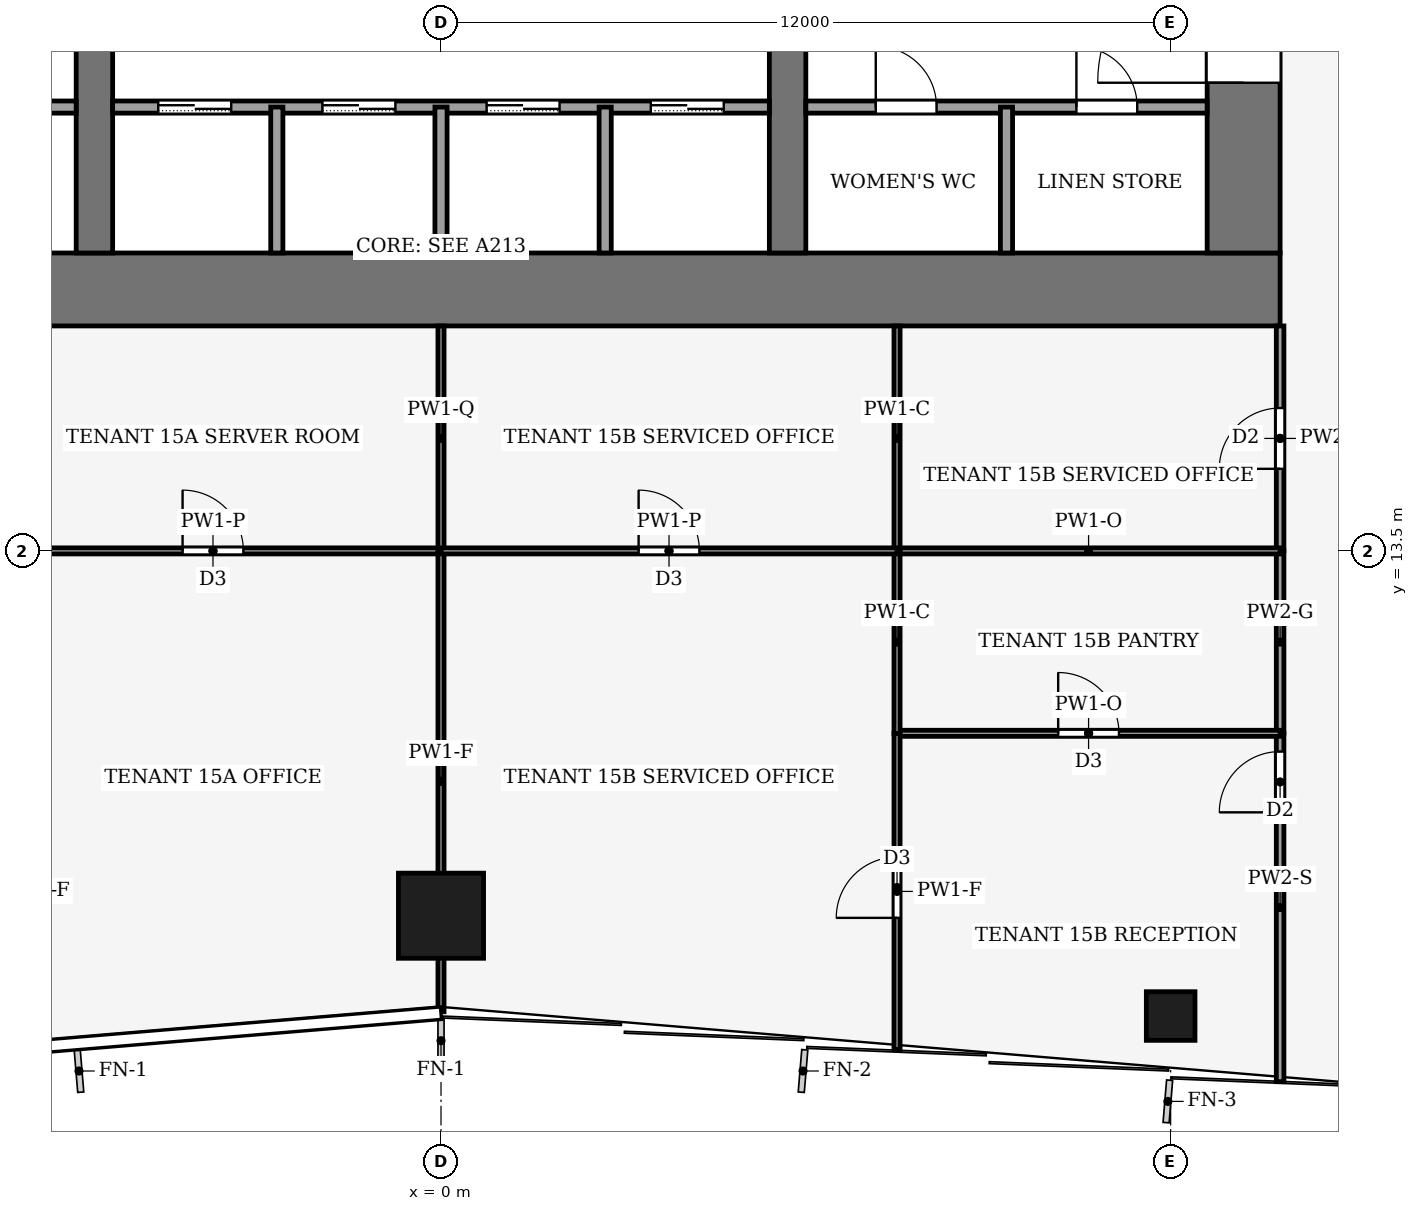
"""IFC4 building model, lengths in metres.
Left out: names, types, materials, properties, quantities, classifications, styles, units other than length and angle.
Written with IfcOpenShell. Run it as: python <this file> out.ifc"""

import sys

from ifc_helpers import new_model, si_unit, direction, frame, frame_2d, origin, origin_2d, place, context, subcontext, project, spatial, rectangle, hollow_rectangle, extrude, element, fill, save


model = new_model("IFC4")
c1 = context("Model", 3, precision=1e-05, world=origin(), true_north=direction((0.0, 1.0)))
c2 = subcontext(c1, "Body", "Model", "MODEL_VIEW")
j1 = project(units=[si_unit("LENGTHUNIT", "METRE"), si_unit("PLANEANGLEUNIT", "RADIAN")], contexts=[c1])
p1 = place(None, origin())
s1 = spatial("IfcSite", under=j1, at=p1, CompositionType="ELEMENT")
p2 = place(p1, origin())
s2 = spatial("IfcBuilding", under=s1, at=p2, CompositionType="ELEMENT")
p3 = place(p2, frame((0.0, 0.0, 70.0)))
s3 = spatial("IfcBuildingStorey", under=s2, at=p3, CompositionType="ELEMENT", Elevation=70.0)
p4 = place(p3, frame((-13.8, 17.8, -0.13), z_axis=(0.0, 0.0, 1.0), x_axis=(1.0, 0.0, 0.0)))
e1 = element("IfcWall", 1, at=p4, inside=s3, PredefinedType="SHEAR", context=c2, shape_type="SweptSolid", body=[
    extrude(rectangle(XDim=27.6, YDim=1.2, at=frame_2d((13.8, 0.0))), origin(), (0.0, 0.0, 1.0), 4.0),
])
p5 = place(p3, frame((13.2, 18.4, -0.13), z_axis=(0.0, 0.0, 1.0), x_axis=(0.0, 1.0, 0.0)))
e2 = element("IfcWall", 2, at=p5, inside=s3, PredefinedType="SHEAR", context=c2, shape_type="SweptSolid", body=[
    extrude(rectangle(XDim=19.2, YDim=1.2, at=frame_2d((9.6, 0.0))), origin(), (0.0, 0.0, 1.0), 4.0),
])
p6 = place(p5, frame((2.8, 0.0, 0.13)))
e3 = element("IfcOpeningElement", 3, at=p6, cuts=e2, PredefinedType="OPENING", context=c2, shape_type="SweptSolid", body=[
    extrude(rectangle(XDim=2.4, YDim=2.4, at=frame_2d((1.2, 1.2))), frame((0.0, 0.61, 0.0), z_axis=(0.0, -1.0, 0.0), x_axis=(1.0, 0.0, 0.0)), (0.0, 0.0, 1.0), 1.22),
])
p7 = place(p5, frame((13.3, 0.0, 0.13)))
e4 = element("IfcOpeningElement", 4, at=p7, cuts=e2, PredefinedType="OPENING", context=c2, shape_type="SweptSolid", body=[
    extrude(rectangle(XDim=2.4, YDim=2.4, at=frame_2d((1.2, 1.2))), frame((0.0, 0.61, 0.0), z_axis=(0.0, -1.0, 0.0), x_axis=(1.0, 0.0, 0.0)), (0.0, 0.0, 1.0), 1.22),
])
p8 = place(p3, frame((-5.7, 18.4, -0.13), z_axis=(0.0, 0.0, 1.0), x_axis=(0.0, 1.0, 0.0)))
e5 = element("IfcWall", 5, at=p8, inside=s3, PredefinedType="SHEAR", context=c2, shape_type="SweptSolid", body=[
    extrude(rectangle(XDim=19.2, YDim=0.6, at=frame_2d((9.6, 0.0))), origin(), (0.0, 0.0, 1.0), 4.0),
])
p9 = place(p8, frame((8.35, 0.0, 0.13)))
e6 = element("IfcOpeningElement", 6, at=p9, cuts=e5, PredefinedType="OPENING", context=c2, shape_type="SweptSolid", body=[
    extrude(rectangle(XDim=0.9, YDim=2.1, at=frame_2d((0.45, 1.05))), frame((0.0, 0.31, 0.0), z_axis=(0.0, -1.0, 0.0), x_axis=(1.0, 0.0, 0.0)), (0.0, 0.0, 1.0), 0.62),
])
p10 = place(p3, frame((5.7, 18.4, -0.13), z_axis=(0.0, 0.0, 1.0), x_axis=(0.0, 1.0, 0.0)))
e7 = element("IfcWall", 7, at=p10, inside=s3, PredefinedType="SHEAR", context=c2, shape_type="SweptSolid", body=[
    extrude(rectangle(XDim=19.2, YDim=0.6, at=frame_2d((9.6, 0.0))), origin(), (0.0, 0.0, 1.0), 4.0),
])
p11 = place(p10, frame((13.3, 0.0, 0.13)))
e8 = element("IfcOpeningElement", 8, at=p11, cuts=e7, PredefinedType="OPENING", context=c2, shape_type="SweptSolid", body=[
    extrude(rectangle(XDim=2.4, YDim=2.4, at=frame_2d((1.2, 1.2))), frame((0.0, 0.31, 0.0), z_axis=(0.0, -1.0, 0.0), x_axis=(1.0, 0.0, 0.0)), (0.0, 0.0, 1.0), 0.62),
])
p12 = place(p3, frame((0.0, 7.5, 0.0), z_axis=(0.0, 0.0, 1.0), x_axis=(1.0, 0.0, 0.0)))
e9 = element("IfcColumn", 9, at=p12, inside=s3, PredefinedType="COLUMN", context=c2, shape_type="SweptSolid", body=[
    extrude(hollow_rectangle(XDim=1.4, YDim=1.4, WallThickness=0.08, at=origin_2d()), origin(), (0.0, 0.0, 1.0), 4.0),
])
p13 = place(p3, frame((12.0, 5.85, 0.0), z_axis=(0.0, 0.0, 1.0), x_axis=(1.0, 0.0, 0.0)))
e10 = element("IfcColumn", 10, at=p13, inside=s3, PredefinedType="COLUMN", context=c2, shape_type="SweptSolid", body=[
    extrude(hollow_rectangle(XDim=0.8, YDim=0.8, WallThickness=0.04, at=origin_2d()), origin(), (0.0, 0.0, 1.0), 4.0),
])
p14 = place(p3, frame((-12.6, 20.8, 0.0), z_axis=(0.0, 0.0, 1.0), x_axis=(1.0, 0.0, 0.0)))
e11 = element("IfcWall", 11, at=p14, inside=s3, PredefinedType="PARTITIONING", context=c2, shape_type="SweptSolid", body=[
    extrude(rectangle(XDim=6.6, YDim=0.2, at=frame_2d((3.3, 0.0))), origin(), (0.0, 0.0, 1.0), 3.87),
])
p15 = place(p14, frame((0.49, 0.0, 0.0)))
e12 = element("IfcOpeningElement", 12, at=p15, cuts=e11, PredefinedType="OPENING", context=c2, shape_type="SweptSolid", body=[
    extrude(rectangle(XDim=1.0, YDim=2.1, at=frame_2d((0.5, 1.05))), frame((0.0, 0.11, 0.0), z_axis=(0.0, -1.0, 0.0), x_axis=(1.0, 0.0, 0.0)), (0.0, 0.0, 1.0), 0.22),
])
p16 = place(p14, frame((3.79, 0.0, 0.0)))
e13 = element("IfcOpeningElement", 13, at=p16, cuts=e11, PredefinedType="OPENING", context=c2, shape_type="SweptSolid", body=[
    extrude(rectangle(XDim=1.0, YDim=2.1, at=frame_2d((0.5, 1.05))), frame((0.0, 0.11, 0.0), z_axis=(0.0, -1.0, 0.0), x_axis=(1.0, 0.0, 0.0)), (0.0, 0.0, 1.0), 0.22),
])
p17 = place(p3, frame((-5.4, 20.8, 0.0), z_axis=(0.0, 0.0, 1.0), x_axis=(1.0, 0.0, 0.0)))
e14 = element("IfcWall", 14, at=p17, inside=s3, PredefinedType="PARTITIONING", context=c2, shape_type="SweptSolid", body=[
    extrude(rectangle(XDim=10.8, YDim=0.2, at=frame_2d((5.4, 0.0))), origin(), (0.0, 0.0, 1.0), 3.87),
])
p18 = place(p17, frame((0.75, 0.0, 0.0)))
e15 = element("IfcOpeningElement", 15, at=p18, cuts=e14, PredefinedType="OPENING", context=c2, shape_type="SweptSolid", body=[
    extrude(rectangle(XDim=1.2, YDim=2.2, at=frame_2d((0.6, 1.1))), frame((0.0, 0.11, 0.0), z_axis=(0.0, -1.0, 0.0), x_axis=(1.0, 0.0, 0.0)), (0.0, 0.0, 1.0), 0.22),
])
p19 = place(p17, frame((3.45, 0.0, 0.0)))
e16 = element("IfcOpeningElement", 16, at=p19, cuts=e14, PredefinedType="OPENING", context=c2, shape_type="SweptSolid", body=[
    extrude(rectangle(XDim=1.2, YDim=2.2, at=frame_2d((0.6, 1.1))), frame((0.0, 0.11, 0.0), z_axis=(0.0, -1.0, 0.0), x_axis=(1.0, 0.0, 0.0)), (0.0, 0.0, 1.0), 0.22),
])
p20 = place(p17, frame((6.15, 0.0, 0.0)))
e17 = element("IfcOpeningElement", 17, at=p20, cuts=e14, PredefinedType="OPENING", context=c2, shape_type="SweptSolid", body=[
    extrude(rectangle(XDim=1.2, YDim=2.2, at=frame_2d((0.6, 1.1))), frame((0.0, 0.11, 0.0), z_axis=(0.0, -1.0, 0.0), x_axis=(1.0, 0.0, 0.0)), (0.0, 0.0, 1.0), 0.22),
])
p21 = place(p17, frame((8.85, 0.0, 0.0)))
e18 = element("IfcOpeningElement", 18, at=p21, cuts=e14, PredefinedType="OPENING", context=c2, shape_type="SweptSolid", body=[
    extrude(rectangle(XDim=1.2, YDim=2.2, at=frame_2d((0.6, 1.1))), frame((0.0, 0.11, 0.0), z_axis=(0.0, -1.0, 0.0), x_axis=(1.0, 0.0, 0.0)), (0.0, 0.0, 1.0), 0.22),
])
p22 = place(p3, frame((6.0, 20.8, 0.0), z_axis=(0.0, 0.0, 1.0), x_axis=(1.0, 0.0, 0.0)))
e19 = element("IfcWall", 19, at=p22, inside=s3, PredefinedType="PARTITIONING", context=c2, shape_type="SweptSolid", body=[
    extrude(rectangle(XDim=6.6, YDim=0.2, at=frame_2d((3.3, 0.0))), origin(), (0.0, 0.0, 1.0), 3.87),
])
p23 = place(p22, frame((1.15, 0.0, 0.0)))
e20 = element("IfcOpeningElement", 20, at=p23, cuts=e19, PredefinedType="OPENING", context=c2, shape_type="SweptSolid", body=[
    extrude(rectangle(XDim=1.0, YDim=2.1, at=frame_2d((0.5, 1.05))), frame((0.0, 0.11, 0.0), z_axis=(0.0, -1.0, 0.0), x_axis=(1.0, 0.0, 0.0)), (0.0, 0.0, 1.0), 0.22),
])
p24 = place(p22, frame((4.45, 0.0, 0.0)))
e21 = element("IfcOpeningElement", 21, at=p24, cuts=e19, PredefinedType="OPENING", context=c2, shape_type="SweptSolid", body=[
    extrude(rectangle(XDim=1.0, YDim=2.1, at=frame_2d((0.5, 1.05))), frame((0.0, 0.11, 0.0), z_axis=(0.0, -1.0, 0.0), x_axis=(1.0, 0.0, 0.0)), (0.0, 0.0, 1.0), 0.22),
])
for number, where, z_axis, x_axis in (
    (22, (-2.7, 18.4, 0.0), (0.0, 0.0, 1.0), (0.0, 1.0, 0.0)),
    (23, (0.0, 18.4, 0.0), (0.0, 0.0, 1.0), (0.0, 1.0, 0.0)),
    (24, (2.7, 18.4, 0.0), (0.0, 0.0, 1.0), (0.0, 1.0, 0.0)),
    (25, (9.3, 18.4, 0.0), (0.0, 0.0, 1.0), (0.0, 1.0, 0.0)),
):
    element("IfcWall", number, at=place(p3, frame(where, z_axis=z_axis, x_axis=x_axis)), inside=s3, PredefinedType="PARTITIONING", context=c2, shape_type="SweptSolid", body=[
        extrude(rectangle(XDim=2.4, YDim=0.2, at=frame_2d((1.2, 0.0))), origin(), (0.0, 0.0, 1.0), 3.87),
    ])
p25 = place(p3, frame((13.8, 4.77, 0.0), z_axis=(0.0, 0.0, 1.0), x_axis=(0.0, 1.0, 0.0)))
e26 = element("IfcWall", 26, at=p25, inside=s3, PredefinedType="PARTITIONING", context=c2, shape_type="SweptSolid", body=[
    extrude(rectangle(XDim=5.73, YDim=0.125, at=frame_2d((2.865, 0.0))), origin(), (0.0, 0.0, 1.0), 3.04),
])
p26 = place(p25, frame((4.43, 0.0, 0.0)))
e27 = element("IfcOpeningElement", 27, at=p26, cuts=e26, PredefinedType="OPENING", context=c2, shape_type="SweptSolid", body=[
    extrude(rectangle(XDim=1.0, YDim=2.1, at=frame_2d((0.5, 1.05))), frame((0.0, 0.073, 0.0), z_axis=(0.0, -1.0, 0.0), x_axis=(1.0, 0.0, 0.0)), (0.0, 0.0, 1.0), 0.145),
])
p27 = place(p3, frame((13.8, 13.5, 0.0), z_axis=(0.0, 0.0, 1.0), x_axis=(0.0, -1.0, 0.0)))
e28 = element("IfcWall", 28, at=p27, inside=s3, PredefinedType="PARTITIONING", context=c2, shape_type="SweptSolid", body=[
    extrude(rectangle(XDim=3.0, YDim=0.125, at=frame_2d((1.5, 0.0))), origin(), (0.0, 0.0, 1.0), 3.87),
])
p28 = place(p3, frame((13.8, 13.5, 0.0), z_axis=(0.0, 0.0, 1.0), x_axis=(0.0, 1.0, 0.0)))
e29 = element("IfcWall", 29, at=p28, inside=s3, PredefinedType="PARTITIONING", context=c2, shape_type="SweptSolid", body=[
    extrude(rectangle(XDim=3.7, YDim=0.125, at=frame_2d((1.85, 0.0))), origin(), (0.0, 0.0, 1.0), 3.14),
])
p29 = place(p28, frame((1.35, 0.0, 0.0)))
e30 = element("IfcOpeningElement", 30, at=p29, cuts=e29, PredefinedType="OPENING", context=c2, shape_type="SweptSolid", body=[
    extrude(rectangle(XDim=1.0, YDim=2.1, at=frame_2d((0.5, 1.05))), frame((0.0, 0.073, 0.0), z_axis=(0.0, -1.0, 0.0), x_axis=(1.0, 0.0, 0.0)), (0.0, 0.0, 1.0), 0.145),
])
p30 = place(p3, frame((-7.5, 13.5, 0.0), z_axis=(0.0, 0.0, 1.0), x_axis=(1.0, 0.0, 0.0)))
e31 = element("IfcWall", 31, at=p30, inside=s3, PredefinedType="PARTITIONING", context=c2, shape_type="SweptSolid", body=[
    extrude(rectangle(XDim=7.5, YDim=0.1, at=frame_2d((3.75, 0.0))), origin(), (0.0, 0.0, 1.0), 3.44),
])
p31 = place(p30, frame((3.25, 0.0, 0.0)))
e32 = element("IfcOpeningElement", 32, at=p31, cuts=e31, PredefinedType="OPENING", context=c2, shape_type="SweptSolid", body=[
    extrude(rectangle(XDim=1.0, YDim=2.1, at=frame_2d((0.5, 1.05))), frame((0.0, 0.06, 0.0), z_axis=(0.0, -1.0, 0.0), x_axis=(1.0, 0.0, 0.0)), (0.0, 0.0, 1.0), 0.12),
])
p32 = place(p3, frame((0.0, 5.92, 0.0), z_axis=(0.0, 0.0, 1.0), x_axis=(0.0, 1.0, 0.0)))
e33 = element("IfcWall", 33, at=p32, inside=s3, PredefinedType="PARTITIONING", context=c2, shape_type="SweptSolid", body=[
    extrude(rectangle(XDim=7.58, YDim=0.1, at=frame_2d((3.79, 0.0))), origin(), (0.0, 0.0, 1.0), 3.04),
])
p33 = place(p3, frame((0.0, 13.5, 0.0), z_axis=(0.0, 0.0, 1.0), x_axis=(0.0, 1.0, 0.0)))
e34 = element("IfcWall", 34, at=p33, inside=s3, PredefinedType="PARTITIONING", context=c2, shape_type="SweptSolid", body=[
    extrude(rectangle(XDim=3.7, YDim=0.1, at=frame_2d((1.85, 0.0))), origin(), (0.0, 0.0, 1.0), 3.48),
])
p34 = place(p3, frame((7.5, 10.5, 0.0), z_axis=(0.0, 0.0, 1.0), x_axis=(1.0, 0.0, 0.0)))
e35 = element("IfcWall", 35, at=p34, inside=s3, PredefinedType="PARTITIONING", context=c2, shape_type="SweptSolid", body=[
    extrude(rectangle(XDim=6.3, YDim=0.1, at=frame_2d((3.15, 0.0))), origin(), (0.0, 0.0, 1.0), 3.39),
])
p35 = place(p34, frame((2.65, 0.0, 0.0)))
e36 = element("IfcOpeningElement", 36, at=p35, cuts=e35, PredefinedType="OPENING", context=c2, shape_type="SweptSolid", body=[
    extrude(rectangle(XDim=1.0, YDim=2.1, at=frame_2d((0.5, 1.05))), frame((0.0, 0.06, 0.0), z_axis=(0.0, -1.0, 0.0), x_axis=(1.0, 0.0, 0.0)), (0.0, 0.0, 1.0), 0.12),
])
p36 = place(p3, frame((7.5, 5.295, 0.0), z_axis=(0.0, 0.0, 1.0), x_axis=(0.0, 1.0, 0.0)))
e37 = element("IfcWall", 37, at=p36, inside=s3, PredefinedType="PARTITIONING", context=c2, shape_type="SweptSolid", body=[
    extrude(rectangle(XDim=5.209, YDim=0.1, at=frame_2d((2.604, 0.0))), origin(), (0.0, 0.0, 1.0), 3.04),
])
p37 = place(p36, frame((2.17, 0.0, 0.0)))
e38 = element("IfcOpeningElement", 38, at=p37, cuts=e37, PredefinedType="OPENING", context=c2, shape_type="SweptSolid", body=[
    extrude(rectangle(XDim=1.0, YDim=2.1, at=frame_2d((0.5, 1.05))), frame((0.0, 0.06, 0.0), z_axis=(0.0, -1.0, 0.0), x_axis=(1.0, 0.0, 0.0)), (0.0, 0.0, 1.0), 0.12),
])
p38 = place(p3, frame((13.8, 13.5, 0.0), z_axis=(0.0, 0.0, 1.0), x_axis=(-1.0, 0.0, 0.0)))
e39 = element("IfcWall", 39, at=p38, inside=s3, PredefinedType="PARTITIONING", context=c2, shape_type="SweptSolid", body=[
    extrude(rectangle(XDim=6.3, YDim=0.1, at=frame_2d((3.15, 0.0))), origin(), (0.0, 0.0, 1.0), 3.39),
])
p39 = place(p3, frame((7.5, 13.5, 0.0), z_axis=(0.0, 0.0, 1.0), x_axis=(0.0, -1.0, 0.0)))
e40 = element("IfcWall", 40, at=p39, inside=s3, PredefinedType="PARTITIONING", context=c2, shape_type="SweptSolid", body=[
    extrude(rectangle(XDim=3.004, YDim=0.1, at=frame_2d((1.502, 0.0))), origin(), (0.0, 0.0, 1.0), 3.87),
])
p40 = place(p3, frame((7.5, 17.2, 0.0), z_axis=(0.0, 0.0, 1.0), x_axis=(0.0, -1.0, 0.0)))
e41 = element("IfcWall", 41, at=p40, inside=s3, PredefinedType="PARTITIONING", context=c2, shape_type="SweptSolid", body=[
    extrude(rectangle(XDim=3.7, YDim=0.1, at=frame_2d((1.85, 0.0))), origin(), (0.0, 0.0, 1.0), 3.87),
])
p41 = place(p3, frame((0.0, 13.5, 0.0), z_axis=(0.0, 0.0, 1.0), x_axis=(1.0, 0.0, 0.0)))
e42 = element("IfcWall", 42, at=p41, inside=s3, PredefinedType="PARTITIONING", context=c2, shape_type="SweptSolid", body=[
    extrude(rectangle(XDim=7.5, YDim=0.1, at=frame_2d((3.75, 0.0))), origin(), (0.0, 0.0, 1.0), 3.44),
])
p42 = place(p41, frame((3.25, 0.0, 0.0)))
e43 = element("IfcOpeningElement", 43, at=p42, cuts=e42, PredefinedType="OPENING", context=c2, shape_type="SweptSolid", body=[
    extrude(rectangle(XDim=1.0, YDim=2.1, at=frame_2d((0.5, 1.05))), frame((0.0, 0.06, 0.0), z_axis=(0.0, -1.0, 0.0), x_axis=(1.0, 0.0, 0.0)), (0.0, 0.0, 1.0), 0.12),
])
p43 = place(p18, origin())
e44 = element("IfcDoor", 44, at=p43, inside=s3, OperationType="SLIDING_TO_LEFT", PredefinedType="DOOR", context=c2, shape_type="SweptSolid", body=[
    extrude(rectangle(XDim=1.2, YDim=2.2, at=frame_2d((0.6, 1.1))), frame((0.0, 0.025, 0.0), z_axis=(0.0, -1.0, 0.0), x_axis=(1.0, 0.0, 0.0)), (0.0, 0.0, 1.0), 0.05),
])
fill(e15, e44)
p44 = place(p19, origin())
e45 = element("IfcDoor", 45, at=p44, inside=s3, OperationType="SLIDING_TO_LEFT", PredefinedType="DOOR", context=c2, shape_type="SweptSolid", body=[
    extrude(rectangle(XDim=1.2, YDim=2.2, at=frame_2d((0.6, 1.1))), frame((0.0, 0.025, 0.0), z_axis=(0.0, -1.0, 0.0), x_axis=(1.0, 0.0, 0.0)), (0.0, 0.0, 1.0), 0.05),
])
fill(e16, e45)
p45 = place(p20, origin())
e46 = element("IfcDoor", 46, at=p45, inside=s3, OperationType="SLIDING_TO_LEFT", PredefinedType="DOOR", context=c2, shape_type="SweptSolid", body=[
    extrude(rectangle(XDim=1.2, YDim=2.2, at=frame_2d((0.6, 1.1))), frame((0.0, 0.025, 0.0), z_axis=(0.0, -1.0, 0.0), x_axis=(1.0, 0.0, 0.0)), (0.0, 0.0, 1.0), 0.05),
])
fill(e17, e46)
p46 = place(p21, origin())
e47 = element("IfcDoor", 47, at=p46, inside=s3, OperationType="SLIDING_TO_LEFT", PredefinedType="DOOR", context=c2, shape_type="SweptSolid", body=[
    extrude(rectangle(XDim=1.2, YDim=2.2, at=frame_2d((0.6, 1.1))), frame((0.0, 0.025, 0.0), z_axis=(0.0, -1.0, 0.0), x_axis=(1.0, 0.0, 0.0)), (0.0, 0.0, 1.0), 0.05),
])
fill(e18, e47)
p47 = place(p23, origin())
e48 = element("IfcDoor", 48, at=p47, inside=s3, OperationType="SINGLE_SWING_LEFT", PredefinedType="DOOR", context=c2, shape_type="SweptSolid", body=[
    extrude(rectangle(XDim=1.0, YDim=2.1, at=frame_2d((0.5, 1.05))), frame((0.0, 0.025, 0.0), z_axis=(0.0, -1.0, 0.0), x_axis=(1.0, 0.0, 0.0)), (0.0, 0.0, 1.0), 0.05),
])
fill(e20, e48)
p48 = place(p24, origin())
e49 = element("IfcDoor", 49, at=p48, inside=s3, OperationType="SINGLE_SWING_LEFT", PredefinedType="DOOR", context=c2, shape_type="SweptSolid", body=[
    extrude(rectangle(XDim=1.0, YDim=2.1, at=frame_2d((0.5, 1.05))), frame((0.0, 0.025, 0.0), z_axis=(0.0, -1.0, 0.0), x_axis=(1.0, 0.0, 0.0)), (0.0, 0.0, 1.0), 0.05),
])
fill(e21, e49)
p49 = place(p6, origin())
e50 = element("IfcDoor", 50, at=p49, inside=s3, OperationType="DOUBLE_DOOR_SINGLE_SWING", PredefinedType="DOOR", context=c2, shape_type="SweptSolid", body=[
    extrude(rectangle(XDim=2.4, YDim=2.4, at=frame_2d((1.2, 1.2))), frame((0.0, 0.025, 0.0), z_axis=(0.0, -1.0, 0.0), x_axis=(1.0, 0.0, 0.0)), (0.0, 0.0, 1.0), 0.05),
])
fill(e3, e50)
p50 = place(p26, origin())
e51 = element("IfcDoor", 51, at=p50, inside=s3, OperationType="SINGLE_SWING_RIGHT", PredefinedType="DOOR", context=c2, shape_type="SweptSolid", body=[
    extrude(rectangle(XDim=1.0, YDim=2.1, at=frame_2d((0.5, 1.05))), frame((0.0, 0.025, 0.0), z_axis=(0.0, -1.0, 0.0), x_axis=(1.0, 0.0, 0.0)), (0.0, 0.0, 1.0), 0.05),
])
fill(e27, e51)
p51 = place(p29, origin())
e52 = element("IfcDoor", 52, at=p51, inside=s3, OperationType="SINGLE_SWING_RIGHT", PredefinedType="DOOR", context=c2, shape_type="SweptSolid", body=[
    extrude(rectangle(XDim=1.0, YDim=2.1, at=frame_2d((0.5, 1.05))), frame((0.0, 0.025, 0.0), z_axis=(0.0, -1.0, 0.0), x_axis=(1.0, 0.0, 0.0)), (0.0, 0.0, 1.0), 0.05),
])
fill(e30, e52)
p52 = place(p31, origin())
e53 = element("IfcDoor", 53, at=p52, inside=s3, OperationType="SINGLE_SWING_RIGHT", PredefinedType="DOOR", context=c2, shape_type="SweptSolid", body=[
    extrude(rectangle(XDim=1.0, YDim=2.1, at=frame_2d((0.5, 1.05))), frame((0.0, 0.025, 0.0), z_axis=(0.0, -1.0, 0.0), x_axis=(1.0, 0.0, 0.0)), (0.0, 0.0, 1.0), 0.05),
])
fill(e32, e53)
p53 = place(p35, origin())
e54 = element("IfcDoor", 54, at=p53, inside=s3, OperationType="SINGLE_SWING_LEFT", PredefinedType="DOOR", context=c2, shape_type="SweptSolid", body=[
    extrude(rectangle(XDim=1.0, YDim=2.1, at=frame_2d((0.5, 1.05))), frame((0.0, 0.025, 0.0), z_axis=(0.0, -1.0, 0.0), x_axis=(1.0, 0.0, 0.0)), (0.0, 0.0, 1.0), 0.05),
])
fill(e36, e54)
p54 = place(p37, origin())
e55 = element("IfcDoor", 55, at=p54, inside=s3, OperationType="SINGLE_SWING_RIGHT", PredefinedType="DOOR", context=c2, shape_type="SweptSolid", body=[
    extrude(rectangle(XDim=1.0, YDim=2.1, at=frame_2d((0.5, 1.05))), frame((0.0, 0.025, 0.0), z_axis=(0.0, -1.0, 0.0), x_axis=(1.0, 0.0, 0.0)), (0.0, 0.0, 1.0), 0.05),
])
fill(e38, e55)
p55 = place(p42, origin())
e56 = element("IfcDoor", 56, at=p55, inside=s3, OperationType="SINGLE_SWING_LEFT", PredefinedType="DOOR", context=c2, shape_type="SweptSolid", body=[
    extrude(rectangle(XDim=1.0, YDim=2.1, at=frame_2d((0.5, 1.05))), frame((0.0, 0.025, 0.0), z_axis=(0.0, -1.0, 0.0), x_axis=(1.0, 0.0, 0.0)), (0.0, 0.0, 1.0), 0.05),
])
fill(e43, e56)
save(model, sys.argv[1])
